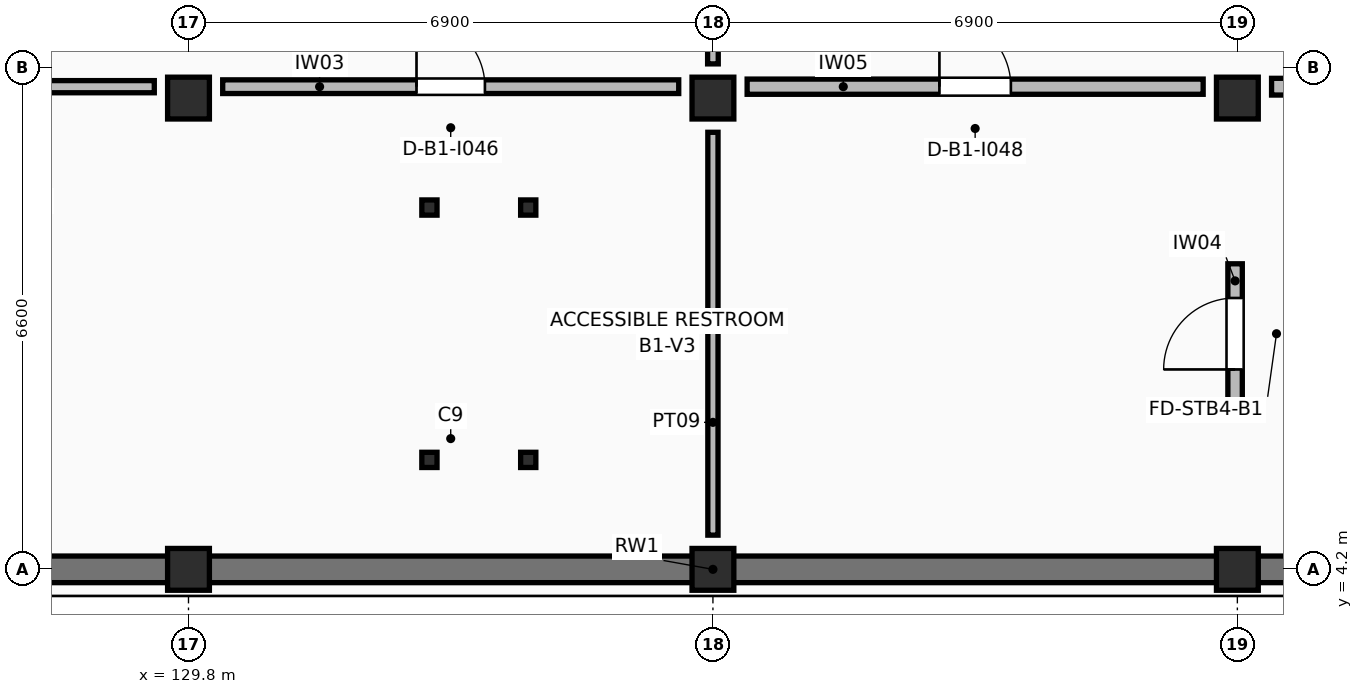
"""IFC4 building model, lengths in metres.
Left out: names, types, materials, properties, quantities, classifications, styles, units other than length and angle.
Written with IfcOpenShell. Run it as: python <this file> out.ifc"""

import sys

from ifc_helpers import new_model, si_unit, direction, frame, frame_2d, origin, origin_2d, place, context, subcontext, project, spatial, rectangle, hollow_rectangle, extrude, element, fill, save


model = new_model("IFC4")
c1 = context("Model", 3, precision=1e-05, world=origin(), true_north=direction((0.0, 1.0)))
c2 = subcontext(c1, "Body", "Model", "MODEL_VIEW")
j1 = project(units=[si_unit("LENGTHUNIT", "METRE"), si_unit("PLANEANGLEUNIT", "RADIAN")], contexts=[c1])
p1 = place(None, origin())
s1 = spatial("IfcSite", under=j1, at=p1, CompositionType="ELEMENT")
p2 = place(p1, origin())
s2 = spatial("IfcBuilding", under=s1, at=p2, CompositionType="ELEMENT")
p3 = place(p2, frame((0.0, 0.0, -4.08)))
s3 = spatial("IfcBuildingStorey", under=s2, at=p3, CompositionType="ELEMENT", Elevation=-4.08)
for number, where, z_axis, x_axis in (
    (1, (129.8, 4.2, 0.0), (0.0, 0.0, 1.0), (1.0, 0.0, 0.0)),
    (2, (129.8, 10.4, 0.0), (0.0, 0.0, 1.0), (1.0, 0.0, 0.0)),
    (3, (136.7, 4.2, 0.0), (0.0, 0.0, 1.0), (1.0, 0.0, 0.0)),
    (4, (136.7, 10.4, 0.0), (0.0, 0.0, 1.0), (1.0, 0.0, 0.0)),
    (5, (143.6, 4.2, 0.0), (0.0, 0.0, 1.0), (1.0, 0.0, 0.0)),
    (6, (143.6, 10.4, 0.0), (0.0, 0.0, 1.0), (1.0, 0.0, 0.0)),
):
    element("IfcColumn", number, at=place(p3, frame(where, z_axis=z_axis, x_axis=x_axis)), inside=s3, PredefinedType="COLUMN", context=c2, shape_type="SweptSolid", body=[
        extrude(rectangle(XDim=0.55, YDim=0.55, at=origin_2d()), origin(), (0.0, 0.0, 1.0), 4.08),
    ])
p4 = place(p3, frame((122.725, 4.2, 0.0), z_axis=(0.0, 0.0, 1.0), x_axis=(1.0, 0.0, 0.0)))
e7 = element("IfcWall", 7, at=p4, inside=s3, PredefinedType="USERDEFINED", context=c2, shape_type="SweptSolid", body=[
    extrude(rectangle(XDim=27.95, YDim=0.35, at=frame_2d((13.975, 0.0))), origin(), (0.0, 0.0, 1.0), 3.065),
])
p5 = place(p3, frame((143.57, 6.38, 0.0), z_axis=(0.0, 0.0, 1.0), x_axis=(0.0, 1.0, 0.0)))
e8 = element("IfcWall", 8, at=p5, inside=s3, PredefinedType="STANDARD", context=c2, shape_type="SweptSolid", body=[
    extrude(rectangle(XDim=1.84, YDim=0.19, at=frame_2d((0.92, 0.0))), origin(), (0.0, 0.0, 1.0), 2.72),
])
p6 = place(p5, frame((0.45, 0.0, 0.0)))
e9 = element("IfcOpeningElement", 9, at=p6, cuts=e8, PredefinedType="OPENING", context=c2, shape_type="SweptSolid", body=[
    extrude(rectangle(XDim=0.94, YDim=2.14, at=frame_2d((0.47, 1.07))), frame((0.0, 0.105, 0.0), z_axis=(0.0, -1.0, 0.0), x_axis=(1.0, 0.0, 0.0)), (0.0, 0.0, 1.0), 0.21),
])
for number, where, z_axis, x_axis in (
    (10, (132.97, 5.64, 0.0), (0.0, 0.0, 1.0), (1.0, 0.0, 0.0)),
    (11, (132.97, 8.96, 0.0), (0.0, 0.0, 1.0), (1.0, 0.0, 0.0)),
    (12, (134.27, 5.64, 0.0), (0.0, 0.0, 1.0), (1.0, 0.0, 0.0)),
    (13, (134.27, 8.96, 0.0), (0.0, 0.0, 1.0), (1.0, 0.0, 0.0)),
):
    element("IfcColumn", number, at=place(p3, frame(where, z_axis=z_axis, x_axis=x_axis)), inside=s3, PredefinedType="COLUMN", context=c2, shape_type="SweptSolid", body=[
        extrude(hollow_rectangle(XDim=0.2, YDim=0.2, WallThickness=0.01, InnerFilletRadius=0.01, OuterFilletRadius=0.02, at=origin_2d()), origin(), (0.0, 0.0, 1.0), 4.08),
    ])
p7 = place(p3, frame((123.35, 10.55, 0.0), z_axis=(0.0, 0.0, 1.0), x_axis=(1.0, 0.0, 0.0)))
e14 = element("IfcWall", 14, at=p7, inside=s3, PredefinedType="STANDARD", context=c2, shape_type="SweptSolid", body=[
    extrude(rectangle(XDim=6.0, YDim=0.16, at=frame_2d((3.0, 0.0))), origin(), (0.0, 0.0, 1.0), 2.72),
])
p8 = place(p7, frame((2.55, 0.0, 0.0)))
e15 = element("IfcOpeningElement", 15, at=p8, cuts=e14, PredefinedType="OPENING", context=c2, shape_type="SweptSolid", body=[
    extrude(rectangle(XDim=0.9, YDim=2.06, at=frame_2d((0.45, 1.03))), frame((0.0, 0.09, 0.0), z_axis=(0.0, -1.0, 0.0), x_axis=(1.0, 0.0, 0.0)), (0.0, 0.0, 1.0), 0.18),
])
p9 = place(p3, frame((130.25, 10.55, 0.0), z_axis=(0.0, 0.0, 1.0), x_axis=(1.0, 0.0, 0.0)))
e16 = element("IfcWall", 16, at=p9, inside=s3, PredefinedType="STANDARD", context=c2, shape_type="SweptSolid", body=[
    extrude(rectangle(XDim=6.0, YDim=0.18, at=frame_2d((3.0, 0.0))), origin(), (0.0, 0.0, 1.0), 2.72),
])
p10 = place(p9, frame((2.55, 0.0, 0.0)))
e17 = element("IfcOpeningElement", 17, at=p10, cuts=e16, PredefinedType="OPENING", context=c2, shape_type="SweptSolid", body=[
    extrude(rectangle(XDim=0.9, YDim=2.18, at=frame_2d((0.45, 1.09))), frame((0.0, 0.1, 0.0), z_axis=(0.0, -1.0, 0.0), x_axis=(1.0, 0.0, 0.0)), (0.0, 0.0, 1.0), 0.2),
])
p11 = place(p3, frame((137.15, 10.55, 0.0), z_axis=(0.0, 0.0, 1.0), x_axis=(1.0, 0.0, 0.0)))
e18 = element("IfcWall", 18, at=p11, inside=s3, PredefinedType="STANDARD", context=c2, shape_type="SweptSolid", body=[
    extrude(rectangle(XDim=6.0, YDim=0.2, at=frame_2d((3.0, 0.0))), origin(), (0.0, 0.0, 1.0), 2.72),
])
p12 = place(p11, frame((2.53, 0.0, 0.0)))
e19 = element("IfcOpeningElement", 19, at=p12, cuts=e18, PredefinedType="OPENING", context=c2, shape_type="SweptSolid", body=[
    extrude(rectangle(XDim=0.94, YDim=2.06, at=frame_2d((0.47, 1.03))), frame((0.0, 0.11, 0.0), z_axis=(0.0, -1.0, 0.0), x_axis=(1.0, 0.0, 0.0)), (0.0, 0.0, 1.0), 0.22),
])
p13 = place(p3, frame((144.05, 10.55, 0.0), z_axis=(0.0, 0.0, 1.0), x_axis=(1.0, 0.0, 0.0)))
e20 = element("IfcWall", 20, at=p13, inside=s3, PredefinedType="STANDARD", context=c2, shape_type="SweptSolid", body=[
    extrude(rectangle(XDim=6.0, YDim=0.22, at=frame_2d((3.0, 0.0))), origin(), (0.0, 0.0, 1.0), 2.72),
])
p14 = place(p13, frame((2.53, 0.0, 0.0)))
e21 = element("IfcOpeningElement", 21, at=p14, cuts=e20, PredefinedType="OPENING", context=c2, shape_type="SweptSolid", body=[
    extrude(rectangle(XDim=0.94, YDim=2.18, at=frame_2d((0.47, 1.09))), frame((0.0, 0.12, 0.0), z_axis=(0.0, -1.0, 0.0), x_axis=(1.0, 0.0, 0.0)), (0.0, 0.0, 1.0), 0.24),
])
p15 = place(p3, frame((136.7, 4.65, 0.0), z_axis=(0.0, 0.0, 1.0), x_axis=(0.0, 1.0, 0.0)))
e22 = element("IfcWall", 22, at=p15, inside=s3, PredefinedType="PARTITIONING", context=c2, shape_type="SweptSolid", body=[
    extrude(rectangle(XDim=5.3, YDim=0.134, at=frame_2d((2.65, 0.0))), origin(), (0.0, 0.0, 1.0), 2.72),
])
p16 = place(p3, frame((136.7, 10.85, 0.0), z_axis=(0.0, 0.0, 1.0), x_axis=(0.0, 1.0, 0.0)))
e23 = element("IfcWall", 23, at=p16, inside=s3, PredefinedType="PARTITIONING", context=c2, shape_type="SweptSolid", body=[
    extrude(rectangle(XDim=5.3, YDim=0.14, at=frame_2d((2.65, 0.0))), origin(), (0.0, 0.0, 1.0), 2.72),
])
p17 = place(p6, frame((0.94, 0.0, 0.0), z_axis=(0.0, 0.0, 1.0), x_axis=(-1.0, 0.0, 0.0)))
e24 = element("IfcDoor", 24, at=p17, inside=s3, OperationType="SINGLE_SWING_LEFT", PredefinedType="DOOR", context=c2, shape_type="SweptSolid", body=[
    extrude(rectangle(XDim=0.94, YDim=2.14, at=frame_2d((0.47, 1.07))), frame((0.0, 0.025, 0.0), z_axis=(0.0, -1.0, 0.0), x_axis=(1.0, 0.0, 0.0)), (0.0, 0.0, 1.0), 0.05),
])
fill(e9, e24)
p18 = place(p10, origin())
e25 = element("IfcDoor", 25, at=p18, inside=s3, OperationType="SINGLE_SWING_LEFT", PredefinedType="DOOR", context=c2, shape_type="SweptSolid", body=[
    extrude(rectangle(XDim=0.9, YDim=2.18, at=frame_2d((0.45, 1.09))), frame((0.0, 0.025, 0.0), z_axis=(0.0, -1.0, 0.0), x_axis=(1.0, 0.0, 0.0)), (0.0, 0.0, 1.0), 0.05),
])
fill(e17, e25)
p19 = place(p12, origin())
e26 = element("IfcDoor", 26, at=p19, inside=s3, OperationType="SINGLE_SWING_LEFT", PredefinedType="DOOR", context=c2, shape_type="SweptSolid", body=[
    extrude(rectangle(XDim=0.94, YDim=2.06, at=frame_2d((0.47, 1.03))), frame((0.0, 0.025, 0.0), z_axis=(0.0, -1.0, 0.0), x_axis=(1.0, 0.0, 0.0)), (0.0, 0.0, 1.0), 0.05),
])
fill(e19, e26)
save(model, sys.argv[1])
